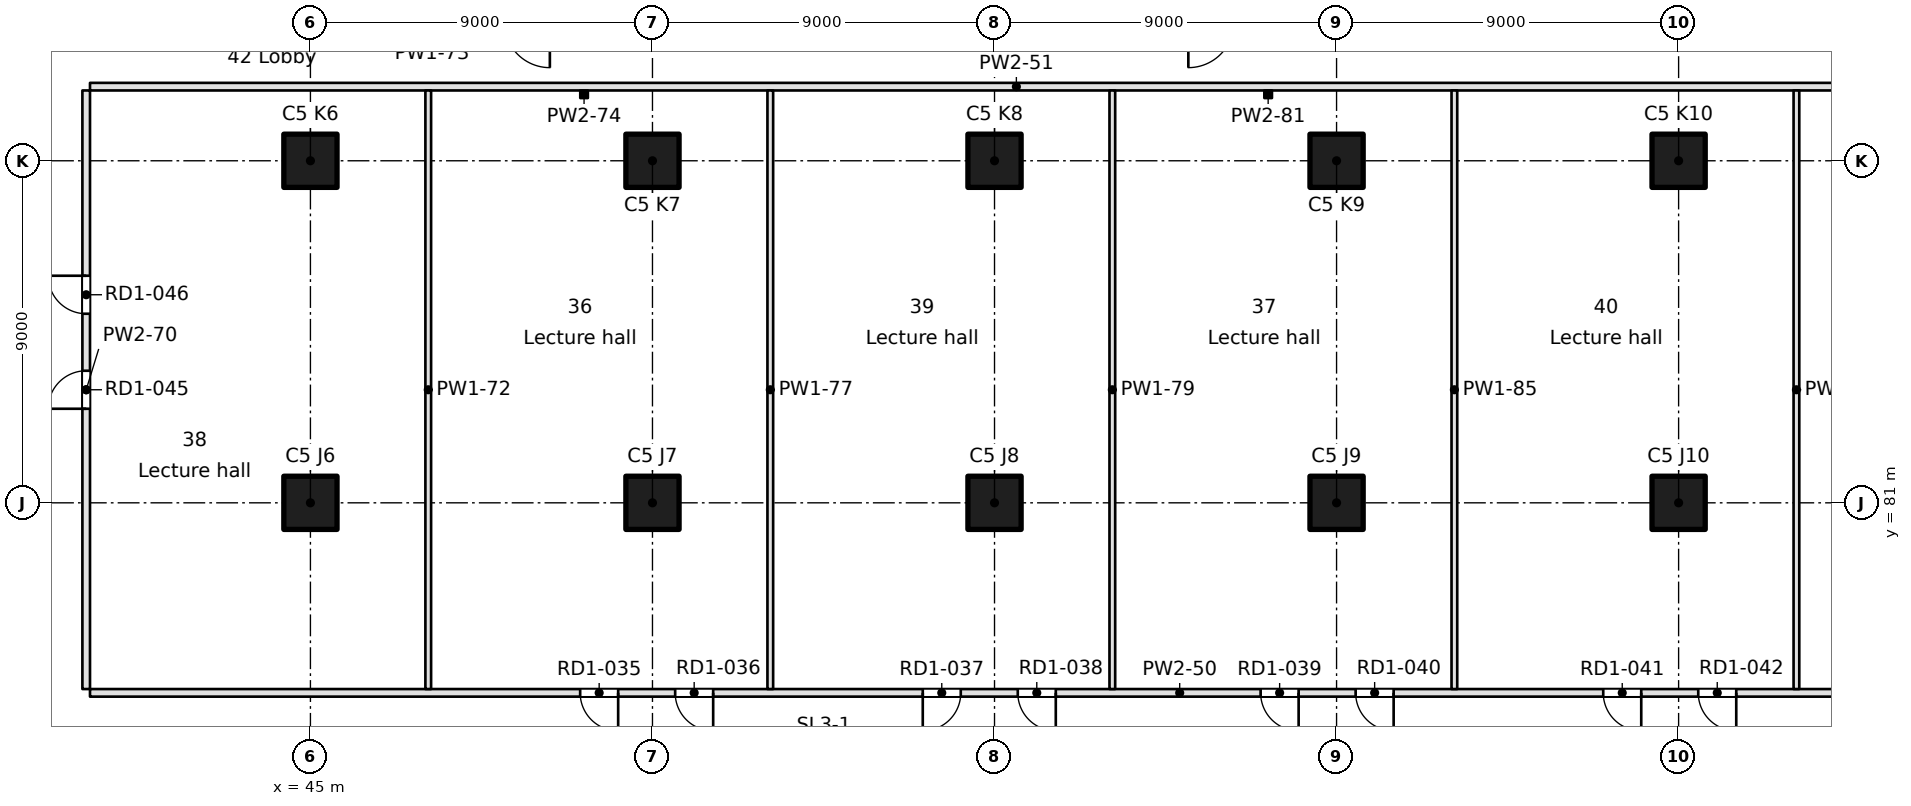
"""IFC4 building model, lengths in metres.
Left out: names, types, materials, properties, quantities, classifications, styles, units other than length and angle.
Written with IfcOpenShell. Run it as: python <this file> out.ifc"""

import sys

from ifc_helpers import new_model, si_unit, direction, frame, frame_2d, origin, origin_2d, place, context, subcontext, project, spatial, rectangle, extrude, element, fill, save


model = new_model("IFC4")
c1 = context("Model", 3, precision=1e-05, world=origin(), true_north=direction((0.0, 1.0)))
c2 = subcontext(c1, "Body", "Model", "MODEL_VIEW")
j1 = project(units=[si_unit("LENGTHUNIT", "METRE"), si_unit("PLANEANGLEUNIT", "RADIAN")], contexts=[c1])
p1 = place(None, origin())
s1 = spatial("IfcSite", under=j1, at=p1, CompositionType="ELEMENT")
p2 = place(p1, origin())
s2 = spatial("IfcBuilding", under=s1, at=p2, CompositionType="ELEMENT")
p3 = place(p2, frame((0.0, 0.0, 46.9)))
s3 = spatial("IfcBuildingStorey", under=s2, at=p3, CompositionType="ELEMENT", Elevation=46.9)
for number, where, z_axis, x_axis in (
    (1, (45.0, 81.0, 0.0), (0.0, 0.0, 1.0), (1.0, 0.0, 0.0)),
    (2, (45.0, 90.0, 0.0), (0.0, 0.0, 1.0), (1.0, 0.0, 0.0)),
    (3, (54.0, 81.0, 0.0), (0.0, 0.0, 1.0), (1.0, 0.0, 0.0)),
    (4, (54.0, 90.0, 0.0), (0.0, 0.0, 1.0), (1.0, 0.0, 0.0)),
    (5, (63.0, 81.0, 0.0), (0.0, 0.0, 1.0), (1.0, 0.0, 0.0)),
    (6, (63.0, 90.0, 0.0), (0.0, 0.0, 1.0), (1.0, 0.0, 0.0)),
    (7, (72.0, 81.0, 0.0), (0.0, 0.0, 1.0), (1.0, 0.0, 0.0)),
    (8, (72.0, 90.0, 0.0), (0.0, 0.0, 1.0), (1.0, 0.0, 0.0)),
    (9, (81.0, 81.0, 0.0), (0.0, 0.0, 1.0), (1.0, 0.0, 0.0)),
    (10, (81.0, 90.0, 0.0), (0.0, 0.0, 1.0), (1.0, 0.0, 0.0)),
):
    element("IfcColumn", number, at=place(p3, frame(where, z_axis=z_axis, x_axis=x_axis)), inside=s3, PredefinedType="COLUMN", context=c2, shape_type="SweptSolid", body=[
        extrude(rectangle(XDim=1.4, YDim=1.4, at=origin_2d()), origin(), (0.0, 0.0, 1.0), 3.7),
    ])
p4 = place(p3, frame((39.2, 76.0, 0.0), z_axis=(0.0, 0.0, 1.0), x_axis=(1.0, 0.0, 0.0)))
e11 = element("IfcWall", 11, at=p4, inside=s3, PredefinedType="PARTITIONING", context=c2, shape_type="SweptSolid", body=[
    extrude(rectangle(XDim=57.345, YDim=0.2, at=frame_2d((28.672, 0.0))), origin(), (0.0, 0.0, 1.0), 3.3),
])
p5 = place(p4, frame((12.897, 0.0, 0.0)))
e12 = element("IfcOpeningElement", 12, at=p5, cuts=e11, PredefinedType="OPENING", context=c2, shape_type="SweptSolid", body=[
    extrude(rectangle(XDim=1.0, YDim=2.1, at=frame_2d((0.5, 1.05))), frame((0.0, 0.1, 0.0), z_axis=(0.0, -1.0, 0.0), x_axis=(1.0, 0.0, 0.0)), (0.0, 0.0, 1.0), 0.2),
])
p6 = place(p4, frame((15.397, 0.0, 0.0)))
e13 = element("IfcOpeningElement", 13, at=p6, cuts=e11, PredefinedType="OPENING", context=c2, shape_type="SweptSolid", body=[
    extrude(rectangle(XDim=1.0, YDim=2.1, at=frame_2d((0.5, 1.05))), frame((0.0, 0.1, 0.0), z_axis=(0.0, -1.0, 0.0), x_axis=(1.0, 0.0, 0.0)), (0.0, 0.0, 1.0), 0.2),
])
p7 = place(p4, frame((21.912, 0.0, 0.0)))
e14 = element("IfcOpeningElement", 14, at=p7, cuts=e11, PredefinedType="OPENING", context=c2, shape_type="SweptSolid", body=[
    extrude(rectangle(XDim=1.0, YDim=2.1, at=frame_2d((0.5, 1.05))), frame((0.0, 0.1, 0.0), z_axis=(0.0, -1.0, 0.0), x_axis=(1.0, 0.0, 0.0)), (0.0, 0.0, 1.0), 0.2),
])
p8 = place(p4, frame((24.412, 0.0, 0.0)))
e15 = element("IfcOpeningElement", 15, at=p8, cuts=e11, PredefinedType="OPENING", context=c2, shape_type="SweptSolid", body=[
    extrude(rectangle(XDim=1.0, YDim=2.1, at=frame_2d((0.5, 1.05))), frame((0.0, 0.1, 0.0), z_axis=(0.0, -1.0, 0.0), x_axis=(1.0, 0.0, 0.0)), (0.0, 0.0, 1.0), 0.2),
])
p9 = place(p4, frame((30.802, 0.0, 0.0)))
e16 = element("IfcOpeningElement", 16, at=p9, cuts=e11, PredefinedType="OPENING", context=c2, shape_type="SweptSolid", body=[
    extrude(rectangle(XDim=1.0, YDim=2.1, at=frame_2d((0.5, 1.05))), frame((0.0, 0.1, 0.0), z_axis=(0.0, -1.0, 0.0), x_axis=(1.0, 0.0, 0.0)), (0.0, 0.0, 1.0), 0.2),
])
p10 = place(p4, frame((33.302, 0.0, 0.0)))
e17 = element("IfcOpeningElement", 17, at=p10, cuts=e11, PredefinedType="OPENING", context=c2, shape_type="SweptSolid", body=[
    extrude(rectangle(XDim=1.0, YDim=2.1, at=frame_2d((0.5, 1.05))), frame((0.0, 0.1, 0.0), z_axis=(0.0, -1.0, 0.0), x_axis=(1.0, 0.0, 0.0)), (0.0, 0.0, 1.0), 0.2),
])
p11 = place(p4, frame((39.817, 0.0, 0.0)))
e18 = element("IfcOpeningElement", 18, at=p11, cuts=e11, PredefinedType="OPENING", context=c2, shape_type="SweptSolid", body=[
    extrude(rectangle(XDim=1.0, YDim=2.1, at=frame_2d((0.5, 1.05))), frame((0.0, 0.1, 0.0), z_axis=(0.0, -1.0, 0.0), x_axis=(1.0, 0.0, 0.0)), (0.0, 0.0, 1.0), 0.2),
])
p12 = place(p4, frame((42.317, 0.0, 0.0)))
e19 = element("IfcOpeningElement", 19, at=p12, cuts=e11, PredefinedType="OPENING", context=c2, shape_type="SweptSolid", body=[
    extrude(rectangle(XDim=1.0, YDim=2.1, at=frame_2d((0.5, 1.05))), frame((0.0, 0.1, 0.0), z_axis=(0.0, -1.0, 0.0), x_axis=(1.0, 0.0, 0.0)), (0.0, 0.0, 1.0), 0.2),
])
p13 = place(p4, frame((50.585, 0.0, 0.0)))
e20 = element("IfcOpeningElement", 20, at=p13, cuts=e11, PredefinedType="OPENING", context=c2, shape_type="SweptSolid", body=[
    extrude(rectangle(XDim=1.0, YDim=2.1, at=frame_2d((0.5, 1.05))), frame((0.0, 0.1, 0.0), z_axis=(0.0, -1.0, 0.0), x_axis=(1.0, 0.0, 0.0)), (0.0, 0.0, 1.0), 0.2),
])
p14 = place(p4, frame((53.085, 0.0, 0.0)))
e21 = element("IfcOpeningElement", 21, at=p14, cuts=e11, PredefinedType="OPENING", context=c2, shape_type="SweptSolid", body=[
    extrude(rectangle(XDim=1.0, YDim=2.1, at=frame_2d((0.5, 1.05))), frame((0.0, 0.1, 0.0), z_axis=(0.0, -1.0, 0.0), x_axis=(1.0, 0.0, 0.0)), (0.0, 0.0, 1.0), 0.2),
])
p15 = place(p3, frame((87.95, 91.95, 0.0), z_axis=(0.0, 0.0, 1.0), x_axis=(-1.0, 0.0, 0.0)))
e22 = element("IfcWall", 22, at=p15, inside=s3, PredefinedType="PARTITIONING", context=c2, shape_type="SweptSolid", body=[
    extrude(rectangle(XDim=48.75, YDim=0.2, at=frame_2d((24.375, 0.0))), origin(), (0.0, 0.0, 1.0), 3.3),
])
p16 = place(p3, frame((39.1, 91.85, 0.0), z_axis=(0.0, 0.0, 1.0), x_axis=(0.0, -1.0, 0.0)))
e23 = element("IfcWall", 23, at=p16, inside=s3, PredefinedType="PARTITIONING", context=c2, shape_type="SweptSolid", body=[
    extrude(rectangle(XDim=15.75, YDim=0.2, at=frame_2d((7.875, 0.0))), origin(), (0.0, 0.0, 1.0), 3.3),
])
p17 = place(p16, frame((7.375, 0.0, 0.0)))
e24 = element("IfcOpeningElement", 24, at=p17, cuts=e23, PredefinedType="OPENING", context=c2, shape_type="SweptSolid", body=[
    extrude(rectangle(XDim=1.0, YDim=2.1, at=frame_2d((0.5, 1.05))), frame((0.0, 0.1, 0.0), z_axis=(0.0, -1.0, 0.0), x_axis=(1.0, 0.0, 0.0)), (0.0, 0.0, 1.0), 0.2),
])
p18 = place(p16, frame((4.875, 0.0, 0.0)))
e25 = element("IfcOpeningElement", 25, at=p18, cuts=e23, PredefinedType="OPENING", context=c2, shape_type="SweptSolid", body=[
    extrude(rectangle(XDim=1.0, YDim=2.1, at=frame_2d((0.5, 1.05))), frame((0.0, 0.1, 0.0), z_axis=(0.0, -1.0, 0.0), x_axis=(1.0, 0.0, 0.0)), (0.0, 0.0, 1.0), 0.2),
])
p19 = place(p3, frame((48.1, 91.85, 0.0), z_axis=(0.0, 0.0, 1.0), x_axis=(0.0, -1.0, 0.0)))
e26 = element("IfcWall", 26, at=p19, inside=s3, PredefinedType="PARTITIONING", context=c2, shape_type="SweptSolid", body=[
    extrude(rectangle(XDim=15.75, YDim=0.15, at=frame_2d((7.875, 0.0))), origin(), (0.0, 0.0, 1.0), 3.3),
])
p20 = place(p3, frame((52.2, 91.85, 0.0), z_axis=(0.0, 0.0, 1.0), x_axis=(0.0, -1.0, 0.0)))
e27 = element("IfcWall", 27, at=p20, inside=s3, PredefinedType="PARTITIONING", context=c2, shape_type="SweptSolid", body=[
    extrude(rectangle(XDim=0.2, YDim=0.2, at=frame_2d((0.1, 0.0))), origin(), (0.0, 0.0, 1.0), 3.3),
])
for number, where, z_axis, x_axis in (
    (28, (57.1, 91.85, 0.0), (0.0, 0.0, 1.0), (0.0, -1.0, 0.0)),
    (29, (66.1, 91.85, 0.0), (0.0, 0.0, 1.0), (0.0, -1.0, 0.0)),
):
    element("IfcWall", number, at=place(p3, frame(where, z_axis=z_axis, x_axis=x_axis)), inside=s3, PredefinedType="PARTITIONING", context=c2, shape_type="SweptSolid", body=[
        extrude(rectangle(XDim=15.75, YDim=0.15, at=frame_2d((7.875, 0.0))), origin(), (0.0, 0.0, 1.0), 3.3),
    ])
p21 = place(p3, frame((70.2, 91.85, 0.0), z_axis=(0.0, 0.0, 1.0), x_axis=(0.0, -1.0, 0.0)))
e30 = element("IfcWall", 30, at=p21, inside=s3, PredefinedType="PARTITIONING", context=c2, shape_type="SweptSolid", body=[
    extrude(rectangle(XDim=0.2, YDim=0.2, at=frame_2d((0.1, 0.0))), origin(), (0.0, 0.0, 1.0), 3.3),
])
for number, where, z_axis, x_axis in (
    (31, (75.1, 91.85, 0.0), (0.0, 0.0, 1.0), (0.0, -1.0, 0.0)),
    (32, (84.1, 91.85, 0.0), (0.0, 0.0, 1.0), (0.0, -1.0, 0.0)),
):
    element("IfcWall", number, at=place(p3, frame(where, z_axis=z_axis, x_axis=x_axis)), inside=s3, PredefinedType="PARTITIONING", context=c2, shape_type="SweptSolid", body=[
        extrude(rectangle(XDim=15.75, YDim=0.15, at=frame_2d((7.875, 0.0))), origin(), (0.0, 0.0, 1.0), 3.3),
    ])
p22 = place(p5, frame((1.0, 0.0, 0.0), z_axis=(0.0, 0.0, 1.0), x_axis=(-1.0, 0.0, 0.0)))
e33 = element("IfcDoor", 33, at=p22, inside=s3, OperationType="SINGLE_SWING_LEFT", PredefinedType="DOOR", context=c2, shape_type="SweptSolid", body=[
    extrude(rectangle(XDim=1.0, YDim=2.1, at=frame_2d((0.5, 1.05))), frame((0.0, 0.025, 0.0), z_axis=(0.0, -1.0, 0.0), x_axis=(1.0, 0.0, 0.0)), (0.0, 0.0, 1.0), 0.05),
])
fill(e12, e33)
p23 = place(p6, frame((1.0, 0.0, 0.0), z_axis=(0.0, 0.0, 1.0), x_axis=(-1.0, 0.0, 0.0)))
e34 = element("IfcDoor", 34, at=p23, inside=s3, OperationType="SINGLE_SWING_LEFT", PredefinedType="DOOR", context=c2, shape_type="SweptSolid", body=[
    extrude(rectangle(XDim=1.0, YDim=2.1, at=frame_2d((0.5, 1.05))), frame((0.0, 0.025, 0.0), z_axis=(0.0, -1.0, 0.0), x_axis=(1.0, 0.0, 0.0)), (0.0, 0.0, 1.0), 0.05),
])
fill(e13, e34)
p24 = place(p7, frame((1.0, 0.0, 0.0), z_axis=(0.0, 0.0, 1.0), x_axis=(-1.0, 0.0, 0.0)))
e35 = element("IfcDoor", 35, at=p24, inside=s3, OperationType="SINGLE_SWING_RIGHT", PredefinedType="DOOR", context=c2, shape_type="SweptSolid", body=[
    extrude(rectangle(XDim=1.0, YDim=2.1, at=frame_2d((0.5, 1.05))), frame((0.0, 0.025, 0.0), z_axis=(0.0, -1.0, 0.0), x_axis=(1.0, 0.0, 0.0)), (0.0, 0.0, 1.0), 0.05),
])
fill(e14, e35)
p25 = place(p8, frame((1.0, 0.0, 0.0), z_axis=(0.0, 0.0, 1.0), x_axis=(-1.0, 0.0, 0.0)))
e36 = element("IfcDoor", 36, at=p25, inside=s3, OperationType="SINGLE_SWING_LEFT", PredefinedType="DOOR", context=c2, shape_type="SweptSolid", body=[
    extrude(rectangle(XDim=1.0, YDim=2.1, at=frame_2d((0.5, 1.05))), frame((0.0, 0.025, 0.0), z_axis=(0.0, -1.0, 0.0), x_axis=(1.0, 0.0, 0.0)), (0.0, 0.0, 1.0), 0.05),
])
fill(e15, e36)
p26 = place(p9, frame((1.0, 0.0, 0.0), z_axis=(0.0, 0.0, 1.0), x_axis=(-1.0, 0.0, 0.0)))
e37 = element("IfcDoor", 37, at=p26, inside=s3, OperationType="SINGLE_SWING_LEFT", PredefinedType="DOOR", context=c2, shape_type="SweptSolid", body=[
    extrude(rectangle(XDim=1.0, YDim=2.1, at=frame_2d((0.5, 1.05))), frame((0.0, 0.025, 0.0), z_axis=(0.0, -1.0, 0.0), x_axis=(1.0, 0.0, 0.0)), (0.0, 0.0, 1.0), 0.05),
])
fill(e16, e37)
p27 = place(p10, frame((1.0, 0.0, 0.0), z_axis=(0.0, 0.0, 1.0), x_axis=(-1.0, 0.0, 0.0)))
e38 = element("IfcDoor", 38, at=p27, inside=s3, OperationType="SINGLE_SWING_LEFT", PredefinedType="DOOR", context=c2, shape_type="SweptSolid", body=[
    extrude(rectangle(XDim=1.0, YDim=2.1, at=frame_2d((0.5, 1.05))), frame((0.0, 0.025, 0.0), z_axis=(0.0, -1.0, 0.0), x_axis=(1.0, 0.0, 0.0)), (0.0, 0.0, 1.0), 0.05),
])
fill(e17, e38)
p28 = place(p11, frame((1.0, 0.0, 0.0), z_axis=(0.0, 0.0, 1.0), x_axis=(-1.0, 0.0, 0.0)))
e39 = element("IfcDoor", 39, at=p28, inside=s3, OperationType="SINGLE_SWING_LEFT", PredefinedType="DOOR", context=c2, shape_type="SweptSolid", body=[
    extrude(rectangle(XDim=1.0, YDim=2.1, at=frame_2d((0.5, 1.05))), frame((0.0, 0.025, 0.0), z_axis=(0.0, -1.0, 0.0), x_axis=(1.0, 0.0, 0.0)), (0.0, 0.0, 1.0), 0.05),
])
fill(e18, e39)
p29 = place(p12, frame((1.0, 0.0, 0.0), z_axis=(0.0, 0.0, 1.0), x_axis=(-1.0, 0.0, 0.0)))
e40 = element("IfcDoor", 40, at=p29, inside=s3, OperationType="SINGLE_SWING_LEFT", PredefinedType="DOOR", context=c2, shape_type="SweptSolid", body=[
    extrude(rectangle(XDim=1.0, YDim=2.1, at=frame_2d((0.5, 1.05))), frame((0.0, 0.025, 0.0), z_axis=(0.0, -1.0, 0.0), x_axis=(1.0, 0.0, 0.0)), (0.0, 0.0, 1.0), 0.05),
])
fill(e19, e40)
p30 = place(p17, frame((1.0, 0.0, 0.0), z_axis=(0.0, 0.0, 1.0), x_axis=(-1.0, 0.0, 0.0)))
e41 = element("IfcDoor", 41, at=p30, inside=s3, OperationType="SINGLE_SWING_LEFT", PredefinedType="DOOR", context=c2, shape_type="SweptSolid", body=[
    extrude(rectangle(XDim=1.0, YDim=2.1, at=frame_2d((0.5, 1.05))), frame((0.0, 0.025, 0.0), z_axis=(0.0, -1.0, 0.0), x_axis=(1.0, 0.0, 0.0)), (0.0, 0.0, 1.0), 0.05),
])
fill(e24, e41)
p31 = place(p18, frame((1.0, 0.0, 0.0), z_axis=(0.0, 0.0, 1.0), x_axis=(-1.0, 0.0, 0.0)))
e42 = element("IfcDoor", 42, at=p31, inside=s3, OperationType="SINGLE_SWING_RIGHT", PredefinedType="DOOR", context=c2, shape_type="SweptSolid", body=[
    extrude(rectangle(XDim=1.0, YDim=2.1, at=frame_2d((0.5, 1.05))), frame((0.0, 0.025, 0.0), z_axis=(0.0, -1.0, 0.0), x_axis=(1.0, 0.0, 0.0)), (0.0, 0.0, 1.0), 0.05),
])
fill(e25, e42)
save(model, sys.argv[1])
